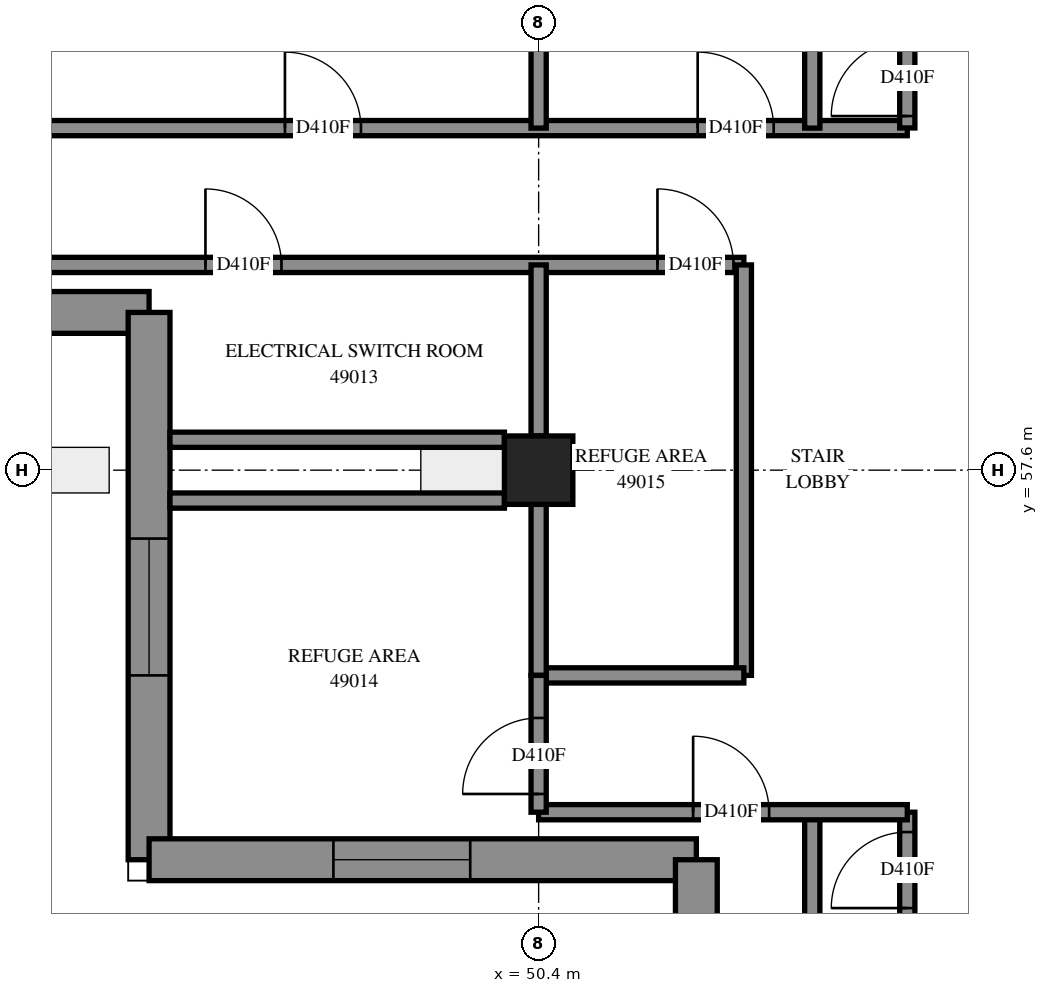
"""IFC4 building model, lengths in metres.
Left out: names, types, materials, properties, quantities, classifications, styles, units other than length and angle.
Written with IfcOpenShell. Run it as: python <this file> out.ifc"""

import sys

from ifc_helpers import new_model, si_unit, direction, frame, frame_2d, origin, origin_2d, place, context, subcontext, project, spatial, polyline, rectangle, outline, extrude, element, fill, save


model = new_model("IFC4")
c1 = context("Model", 3, precision=1e-05, world=origin(), true_north=direction((0.0, 1.0)))
c2 = subcontext(c1, "Body", "Model", "MODEL_VIEW")
j1 = project(units=[si_unit("LENGTHUNIT", "METRE"), si_unit("PLANEANGLEUNIT", "RADIAN")], contexts=[c1])
p1 = place(None, origin())
s1 = spatial("IfcSite", under=j1, at=p1, CompositionType="ELEMENT")
p2 = place(p1, origin())
s2 = spatial("IfcBuilding", under=s1, at=p2, CompositionType="ELEMENT")
p3 = place(p2, frame((0.0, 0.0, 180.4)))
s3 = spatial("IfcBuildingStorey", under=s2, at=p3, CompositionType="ELEMENT", Elevation=180.4)
p4 = place(p3, frame((50.4, 57.6, 0.0), z_axis=(0.0, 0.0, 1.0), x_axis=(1.0, 0.0, 0.0)))
e1 = element("IfcColumn", 1, at=p4, inside=s3, PredefinedType="COLUMN", context=c2, shape_type="SweptSolid", body=[
    extrude(rectangle(XDim=0.9, YDim=0.9, at=origin_2d()), origin(), (0.0, 0.0, 1.0), 4.7),
])
p5 = place(p3, frame((38.075, 59.675, 0.0), z_axis=(0.0, 0.0, 1.0), x_axis=(1.0, 0.0, 0.0)))
e2 = element("IfcWall", 2, at=p5, inside=s3, PredefinedType="SOLIDWALL", context=c2, shape_type="SweptSolid", body=[
    extrude(outline(polyline([(-0.275, -0.275), (6.925, -0.275), (7.475, 0.275), (0.275, 0.275), (-0.275, -0.275)])), origin(), (0.0, 0.0, 1.0), 4.7),
])
p6 = place(p5, frame((2.425, 0.0, 0.9)))
e3 = element("IfcOpeningElement", 3, at=p6, cuts=e2, PredefinedType="OPENING", context=c2, shape_type="SweptSolid", body=[
    extrude(rectangle(XDim=1.8, YDim=3.6, at=frame_2d((0.9, 1.8))), frame((0.0, 0.285, 0.0), z_axis=(0.0, -1.0, 0.0), x_axis=(1.0, 0.0, 0.0)), (0.0, 0.0, 1.0), 0.57),
])
p7 = place(p3, frame((45.275, 59.675, 0.0), z_axis=(0.0, 0.0, 1.0), x_axis=(0.0, -1.0, 0.0)))
e4 = element("IfcWall", 4, at=p7, inside=s3, PredefinedType="SOLIDWALL", context=c2, shape_type="SweptSolid", body=[
    extrude(outline(polyline([(0.275, -0.275), (7.475, -0.275), (6.925, 0.275), (-0.275, 0.275), (0.275, -0.275)])), origin(), (0.0, 0.0, 1.0), 4.7),
])
p8 = place(p7, frame((2.975, 0.0, 0.9)))
e5 = element("IfcOpeningElement", 5, at=p8, cuts=e4, PredefinedType="OPENING", context=c2, shape_type="SweptSolid", body=[
    extrude(rectangle(XDim=1.8, YDim=3.6, at=frame_2d((0.9, 1.8))), frame((0.0, 0.285, 0.0), z_axis=(0.0, -1.0, 0.0), x_axis=(1.0, 0.0, 0.0)), (0.0, 0.0, 1.0), 0.57),
])
p9 = place(p3, frame((45.275, 52.475, 0.0), z_axis=(0.0, 0.0, 1.0), x_axis=(1.0, 0.0, 0.0)))
e6 = element("IfcWall", 6, at=p9, inside=s3, PredefinedType="SOLIDWALL", context=c2, shape_type="SweptSolid", body=[
    extrude(outline(polyline([(-0.275, -0.275), (6.925, -0.275), (7.475, 0.275), (0.275, 0.275), (-0.275, -0.275)])), origin(), (0.0, 0.0, 1.0), 4.7),
])
p10 = place(p9, frame((2.425, 0.0, 0.9)))
e7 = element("IfcOpeningElement", 7, at=p10, cuts=e6, PredefinedType="OPENING", context=c2, shape_type="SweptSolid", body=[
    extrude(rectangle(XDim=1.8, YDim=3.6, at=frame_2d((0.9, 1.8))), frame((0.0, 0.285, 0.0), z_axis=(0.0, -1.0, 0.0), x_axis=(1.0, 0.0, 0.0)), (0.0, 0.0, 1.0), 0.57),
])
p11 = place(p3, frame((52.475, 52.475, 0.0), z_axis=(0.0, 0.0, 1.0), x_axis=(0.0, -1.0, 0.0)))
e8 = element("IfcWall", 8, at=p11, inside=s3, PredefinedType="SOLIDWALL", context=c2, shape_type="SweptSolid", body=[
    extrude(outline(polyline([(0.275, -0.275), (7.475, -0.275), (6.925, 0.275), (-0.275, 0.275), (0.275, -0.275)])), origin(), (0.0, 0.0, 1.0), 4.7),
])
p12 = place(p11, frame((2.975, 0.0, 0.9)))
e9 = element("IfcOpeningElement", 9, at=p12, cuts=e8, PredefinedType="OPENING", context=c2, shape_type="SweptSolid", body=[
    extrude(rectangle(XDim=1.8, YDim=3.6, at=frame_2d((0.9, 1.8))), frame((0.0, 0.285, 0.0), z_axis=(0.0, -1.0, 0.0), x_axis=(1.0, 0.0, 0.0)), (0.0, 0.0, 1.0), 0.57),
])
p13 = place(p3, frame((40.502, 62.1, 0.0), z_axis=(0.0, 0.0, 1.0), x_axis=(1.0, 0.0, 0.0)))
e10 = element("IfcWall", 10, at=p13, inside=s3, PredefinedType="PARTITIONING", context=c2, shape_type="SweptSolid", body=[
    extrude(rectangle(XDim=14.748, YDim=0.2, at=frame_2d((7.374, 0.0))), origin(), (0.0, 0.0, 1.0), 4.7),
])
p14 = place(p13, frame((0.265, 0.0, 0.0)))
e11 = element("IfcOpeningElement", 11, at=p14, cuts=e10, PredefinedType="OPENING", context=c2, shape_type="SweptSolid", body=[
    extrude(rectangle(XDim=1.0, YDim=2.1, at=frame_2d((0.5, 1.05))), frame((0.0, 0.11, 0.0), z_axis=(0.0, -1.0, 0.0), x_axis=(1.0, 0.0, 0.0)), (0.0, 0.0, 1.0), 0.22),
])
p15 = place(p13, frame((6.561, 0.0, 0.0)))
e12 = element("IfcOpeningElement", 12, at=p15, cuts=e10, PredefinedType="OPENING", context=c2, shape_type="SweptSolid", body=[
    extrude(rectangle(XDim=1.0, YDim=2.1, at=frame_2d((0.5, 1.05))), frame((0.0, 0.11, 0.0), z_axis=(0.0, -1.0, 0.0), x_axis=(1.0, 0.0, 0.0)), (0.0, 0.0, 1.0), 0.22),
])
p16 = place(p13, frame((11.991, 0.0, 0.0)))
e13 = element("IfcOpeningElement", 13, at=p16, cuts=e10, PredefinedType="OPENING", context=c2, shape_type="SweptSolid", body=[
    extrude(rectangle(XDim=1.0, YDim=2.1, at=frame_2d((0.5, 1.05))), frame((0.0, 0.11, 0.0), z_axis=(0.0, -1.0, 0.0), x_axis=(1.0, 0.0, 0.0)), (0.0, 0.0, 1.0), 0.22),
])
p17 = place(p3, frame((38.35, 60.3, 0.0), z_axis=(0.0, 0.0, 1.0), x_axis=(1.0, 0.0, 0.0)))
e14 = element("IfcWall", 14, at=p17, inside=s3, PredefinedType="PARTITIONING", context=c2, shape_type="SweptSolid", body=[
    extrude(rectangle(XDim=14.75, YDim=0.2, at=frame_2d((7.375, 0.0))), origin(), (0.0, 0.0, 1.0), 4.7),
])
p18 = place(p17, frame((7.667, 0.0, 0.0)))
e15 = element("IfcOpeningElement", 15, at=p18, cuts=e14, PredefinedType="OPENING", context=c2, shape_type="SweptSolid", body=[
    extrude(rectangle(XDim=1.0, YDim=2.1, at=frame_2d((0.5, 1.05))), frame((0.0, 0.11, 0.0), z_axis=(0.0, -1.0, 0.0), x_axis=(1.0, 0.0, 0.0)), (0.0, 0.0, 1.0), 0.22),
])
p19 = place(p17, frame((13.613, 0.0, 0.0)))
e16 = element("IfcOpeningElement", 16, at=p19, cuts=e14, PredefinedType="OPENING", context=c2, shape_type="SweptSolid", body=[
    extrude(rectangle(XDim=1.0, YDim=2.1, at=frame_2d((0.5, 1.05))), frame((0.0, 0.11, 0.0), z_axis=(0.0, -1.0, 0.0), x_axis=(1.0, 0.0, 0.0)), (0.0, 0.0, 1.0), 0.22),
])
for number, where, z_axis, x_axis in (
    (17, (54.0, 45.55, 0.0), (0.0, 0.0, 1.0), (0.0, 1.0, 0.0)),
    (18, (54.0, 62.1, 0.0), (0.0, 0.0, 1.0), (0.0, 1.0, 0.0)),
):
    element("IfcWall", number, at=place(p3, frame(where, z_axis=z_axis, x_axis=x_axis)), inside=s3, PredefinedType="PARTITIONING", context=c2, shape_type="SweptSolid", body=[
        extrude(rectangle(XDim=7.55, YDim=0.2, at=frame_2d((3.775, 0.0))), origin(), (0.0, 0.0, 1.0), 4.7),
    ])
p20 = place(p3, frame((53.1, 54.9, 0.0), z_axis=(0.0, 0.0, 1.0), x_axis=(0.0, 1.0, 0.0)))
e19 = element("IfcWall", 19, at=p20, inside=s3, PredefinedType="PARTITIONING", context=c2, shape_type="SweptSolid", body=[
    extrude(rectangle(XDim=5.4, YDim=0.2, at=frame_2d((2.7, 0.0))), origin(), (0.0, 0.0, 1.0), 4.7),
])
p21 = place(p3, frame((55.25, 48.05, 0.0), z_axis=(0.0, 0.0, 1.0), x_axis=(0.0, 1.0, 0.0)))
e20 = element("IfcWall", 20, at=p21, inside=s3, PredefinedType="PARTITIONING", context=c2, shape_type="SweptSolid", body=[
    extrude(rectangle(XDim=5.05, YDim=0.2, at=frame_2d((2.525, 0.0))), origin(), (0.0, 0.0, 1.0), 4.7),
])
p22 = place(p21, frame((3.789, 0.0, 0.0)))
e21 = element("IfcOpeningElement", 21, at=p22, cuts=e20, PredefinedType="OPENING", context=c2, shape_type="SweptSolid", body=[
    extrude(rectangle(XDim=1.0, YDim=2.1, at=frame_2d((0.5, 1.05))), frame((0.0, 0.11, 0.0), z_axis=(0.0, -1.0, 0.0), x_axis=(1.0, 0.0, 0.0)), (0.0, 0.0, 1.0), 0.22),
])
p23 = place(p3, frame((55.25, 62.102, 0.0), z_axis=(0.0, 0.0, 1.0), x_axis=(0.0, 1.0, 0.0)))
e22 = element("IfcWall", 22, at=p23, inside=s3, PredefinedType="PARTITIONING", context=c2, shape_type="SweptSolid", body=[
    extrude(rectangle(XDim=5.048, YDim=0.2, at=frame_2d((2.524, 0.0))), origin(), (0.0, 0.0, 1.0), 4.7),
])
p24 = place(p23, frame((0.157, 0.0, 0.0)))
e23 = element("IfcOpeningElement", 23, at=p24, cuts=e22, PredefinedType="OPENING", context=c2, shape_type="SweptSolid", body=[
    extrude(rectangle(XDim=1.0, YDim=2.1, at=frame_2d((0.5, 1.05))), frame((0.0, 0.11, 0.0), z_axis=(0.0, -1.0, 0.0), x_axis=(1.0, 0.0, 0.0)), (0.0, 0.0, 1.0), 0.22),
])
p25 = place(p3, frame((50.4, 53.1, 0.0), z_axis=(0.0, 0.0, 1.0), x_axis=(1.0, 0.0, 0.0)))
e24 = element("IfcWall", 24, at=p25, inside=s3, PredefinedType="PARTITIONING", context=c2, shape_type="SweptSolid", body=[
    extrude(rectangle(XDim=4.85, YDim=0.2, at=frame_2d((2.425, 0.0))), origin(), (0.0, 0.0, 1.0), 4.7),
])
p26 = place(p25, frame((2.033, 0.0, 0.0)))
e25 = element("IfcOpeningElement", 25, at=p26, cuts=e24, PredefinedType="OPENING", context=c2, shape_type="SweptSolid", body=[
    extrude(rectangle(XDim=1.0, YDim=2.1, at=frame_2d((0.5, 1.05))), frame((0.0, 0.11, 0.0), z_axis=(0.0, -1.0, 0.0), x_axis=(1.0, 0.0, 0.0)), (0.0, 0.0, 1.0), 0.22),
])
for number, where, z_axis, x_axis in (
    (26, (45.55, 57.2, 0.0), (0.0, 0.0, 1.0), (1.0, 0.0, 0.0)),
    (27, (45.55, 58.0, 0.0), (0.0, 0.0, 1.0), (1.0, 0.0, 0.0)),
):
    element("IfcWall", number, at=place(p3, frame(where, z_axis=z_axis, x_axis=x_axis)), inside=s3, PredefinedType="PARTITIONING", context=c2, shape_type="SweptSolid", body=[
        extrude(rectangle(XDim=4.4, YDim=0.2, at=frame_2d((2.2, 0.0))), origin(), (0.0, 0.0, 1.0), 4.7),
    ])
p27 = place(p3, frame((50.4, 54.9, 0.0), z_axis=(0.0, 0.0, 1.0), x_axis=(1.0, 0.0, 0.0)))
e28 = element("IfcWall", 28, at=p27, inside=s3, PredefinedType="PARTITIONING", context=c2, shape_type="SweptSolid", body=[
    extrude(rectangle(XDim=2.7, YDim=0.2, at=frame_2d((1.35, 0.0))), origin(), (0.0, 0.0, 1.0), 4.7),
])
for number, where, z_axis, x_axis in (
    (29, (50.4, 54.9, 0.0), (0.0, 0.0, 1.0), (0.0, 1.0, 0.0)),
    (30, (50.4, 58.05, 0.0), (0.0, 0.0, 1.0), (0.0, 1.0, 0.0)),
    (31, (50.4, 62.1, 0.0), (0.0, 0.0, 1.0), (0.0, 1.0, 0.0)),
):
    element("IfcWall", number, at=place(p3, frame(where, z_axis=z_axis, x_axis=x_axis)), inside=s3, PredefinedType="PARTITIONING", context=c2, shape_type="SweptSolid", body=[
        extrude(rectangle(XDim=2.25, YDim=0.2, at=frame_2d((1.125, 0.0))), origin(), (0.0, 0.0, 1.0), 4.7),
    ])
p28 = place(p3, frame((50.4, 53.1, 0.0), z_axis=(0.0, 0.0, 1.0), x_axis=(0.0, 1.0, 0.0)))
e32 = element("IfcWall", 32, at=p28, inside=s3, PredefinedType="PARTITIONING", context=c2, shape_type="SweptSolid", body=[
    extrude(rectangle(XDim=1.8, YDim=0.2, at=frame_2d((0.9, 0.0))), origin(), (0.0, 0.0, 1.0), 4.7),
])
p29 = place(p28, frame((0.24, 0.0, 0.0)))
e33 = element("IfcOpeningElement", 33, at=p29, cuts=e32, PredefinedType="OPENING", context=c2, shape_type="SweptSolid", body=[
    extrude(rectangle(XDim=1.0, YDim=2.1, at=frame_2d((0.5, 1.05))), frame((0.0, 0.11, 0.0), z_axis=(0.0, -1.0, 0.0), x_axis=(1.0, 0.0, 0.0)), (0.0, 0.0, 1.0), 0.22),
])
p30 = place(p8, origin())
e34 = element("IfcWindow", 34, at=p30, inside=s3, PartitioningType="SINGLE_PANEL", PredefinedType="WINDOW", context=c2, shape_type="SweptSolid", body=[
    extrude(rectangle(XDim=1.8, YDim=3.6, at=frame_2d((0.9, 1.8))), frame((0.0, 0.155, 0.0), z_axis=(0.0, -1.0, 0.0), x_axis=(1.0, 0.0, 0.0)), (0.0, 0.0, 1.0), 0.06),
])
fill(e5, e34)
p31 = place(p10, origin())
e35 = element("IfcWindow", 35, at=p31, inside=s3, PartitioningType="SINGLE_PANEL", PredefinedType="WINDOW", context=c2, shape_type="SweptSolid", body=[
    extrude(rectangle(XDim=1.8, YDim=3.6, at=frame_2d((0.9, 1.8))), frame((0.0, 0.155, 0.0), z_axis=(0.0, -1.0, 0.0), x_axis=(1.0, 0.0, 0.0)), (0.0, 0.0, 1.0), 0.06),
])
fill(e7, e35)
p32 = place(p18, origin())
e36 = element("IfcDoor", 36, at=p32, inside=s3, OperationType="SINGLE_SWING_RIGHT", PredefinedType="DOOR", context=c2, shape_type="SweptSolid", body=[
    extrude(rectangle(XDim=1.0, YDim=2.1, at=frame_2d((0.5, 1.05))), frame((0.0, 0.025, 0.0), z_axis=(0.0, -1.0, 0.0), x_axis=(1.0, 0.0, 0.0)), (0.0, 0.0, 1.0), 0.05),
])
fill(e15, e36)
p33 = place(p29, origin())
e37 = element("IfcDoor", 37, at=p33, inside=s3, OperationType="SINGLE_SWING_LEFT", PredefinedType="DOOR", context=c2, shape_type="SweptSolid", body=[
    extrude(rectangle(XDim=1.0, YDim=2.1, at=frame_2d((0.5, 1.05))), frame((0.0, 0.025, 0.0), z_axis=(0.0, -1.0, 0.0), x_axis=(1.0, 0.0, 0.0)), (0.0, 0.0, 1.0), 0.05),
])
fill(e33, e37)
p34 = place(p19, origin())
e38 = element("IfcDoor", 38, at=p34, inside=s3, OperationType="SINGLE_SWING_LEFT", PredefinedType="DOOR", context=c2, shape_type="SweptSolid", body=[
    extrude(rectangle(XDim=1.0, YDim=2.1, at=frame_2d((0.5, 1.05))), frame((0.0, 0.025, 0.0), z_axis=(0.0, -1.0, 0.0), x_axis=(1.0, 0.0, 0.0)), (0.0, 0.0, 1.0), 0.05),
])
fill(e16, e38)
p35 = place(p26, origin())
e39 = element("IfcDoor", 39, at=p35, inside=s3, OperationType="SINGLE_SWING_LEFT", PredefinedType="DOOR", context=c2, shape_type="SweptSolid", body=[
    extrude(rectangle(XDim=1.0, YDim=2.1, at=frame_2d((0.5, 1.05))), frame((0.0, 0.025, 0.0), z_axis=(0.0, -1.0, 0.0), x_axis=(1.0, 0.0, 0.0)), (0.0, 0.0, 1.0), 0.05),
])
fill(e25, e39)
p36 = place(p22, origin())
e40 = element("IfcDoor", 40, at=p36, inside=s3, OperationType="SINGLE_SWING_RIGHT", PredefinedType="DOOR", context=c2, shape_type="SweptSolid", body=[
    extrude(rectangle(XDim=1.0, YDim=2.1, at=frame_2d((0.5, 1.05))), frame((0.0, 0.025, 0.0), z_axis=(0.0, -1.0, 0.0), x_axis=(1.0, 0.0, 0.0)), (0.0, 0.0, 1.0), 0.05),
])
fill(e21, e40)
p37 = place(p15, origin())
e41 = element("IfcDoor", 41, at=p37, inside=s3, OperationType="SINGLE_SWING_RIGHT", PredefinedType="DOOR", context=c2, shape_type="SweptSolid", body=[
    extrude(rectangle(XDim=1.0, YDim=2.1, at=frame_2d((0.5, 1.05))), frame((0.0, 0.025, 0.0), z_axis=(0.0, -1.0, 0.0), x_axis=(1.0, 0.0, 0.0)), (0.0, 0.0, 1.0), 0.05),
])
fill(e12, e41)
p38 = place(p16, origin())
e42 = element("IfcDoor", 42, at=p38, inside=s3, OperationType="SINGLE_SWING_RIGHT", PredefinedType="DOOR", context=c2, shape_type="SweptSolid", body=[
    extrude(rectangle(XDim=1.0, YDim=2.1, at=frame_2d((0.5, 1.05))), frame((0.0, 0.025, 0.0), z_axis=(0.0, -1.0, 0.0), x_axis=(1.0, 0.0, 0.0)), (0.0, 0.0, 1.0), 0.05),
])
fill(e13, e42)
p39 = place(p24, origin())
e43 = element("IfcDoor", 43, at=p39, inside=s3, OperationType="SINGLE_SWING_LEFT", PredefinedType="DOOR", context=c2, shape_type="SweptSolid", body=[
    extrude(rectangle(XDim=1.0, YDim=2.1, at=frame_2d((0.5, 1.05))), frame((0.0, 0.025, 0.0), z_axis=(0.0, -1.0, 0.0), x_axis=(1.0, 0.0, 0.0)), (0.0, 0.0, 1.0), 0.05),
])
fill(e23, e43)
save(model, sys.argv[1])
